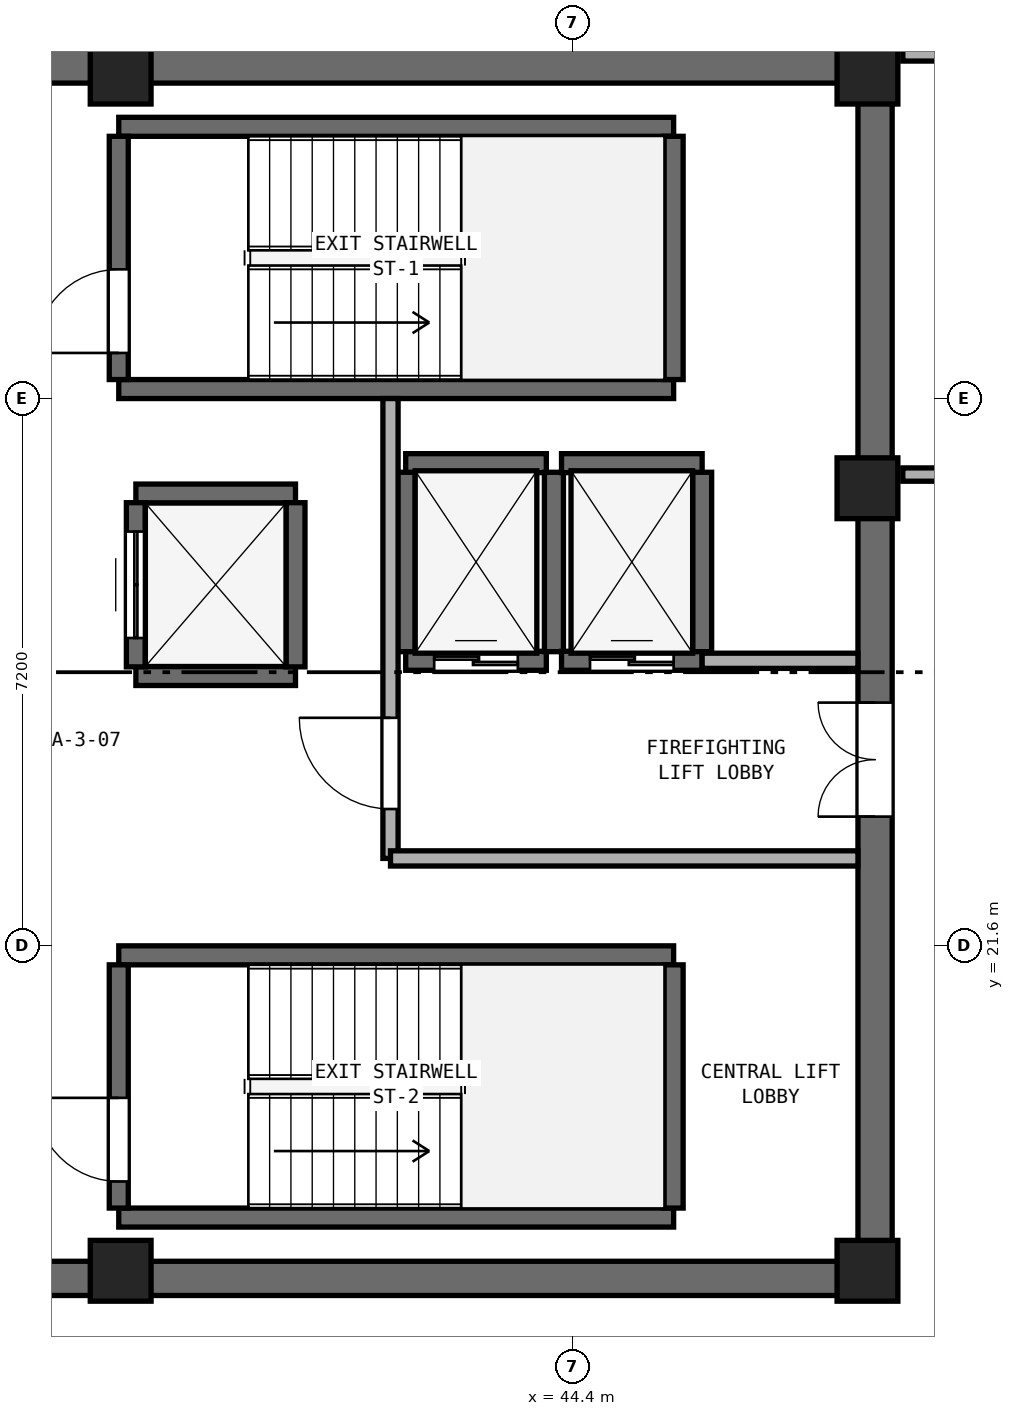
"""IFC4 building model, lengths in metres.
Left out: names, types, materials, properties, quantities, classifications, styles, units other than length and angle.
Written with IfcOpenShell. Run it as: python <this file> out.ifc"""

import sys

from ifc_helpers import new_model, si_unit, direction, frame, frame_2d, origin, origin_2d, place, context, subcontext, project, spatial, rectangle, extrude, element, fill, save


model = new_model("IFC4")
c1 = context("Model", 3, precision=1e-05, world=origin(), true_north=direction((0.0, 1.0)))
c2 = subcontext(c1, "Body", "Model", "MODEL_VIEW")
j1 = project(units=[si_unit("LENGTHUNIT", "METRE"), si_unit("PLANEANGLEUNIT", "RADIAN")], contexts=[c1])
p1 = place(None, origin())
s1 = spatial("IfcSite", under=j1, at=p1, CompositionType="ELEMENT")
p2 = place(p1, origin())
s2 = spatial("IfcBuilding", under=s1, at=p2, CompositionType="ELEMENT")
p3 = place(p2, frame((0.0, 0.0, 228.8)))
s3 = spatial("IfcBuildingStorey", under=s2, at=p3, CompositionType="ELEMENT", Elevation=228.8)
for number, where, z_axis, x_axis in (
    (1, (25.4, 17.225, 0.0), (0.0, 0.0, 1.0), (1.0, 0.0, 0.0)),
    (2, (25.4, 33.175, 0.0), (0.0, 0.0, 1.0), (1.0, 0.0, 0.0)),
):
    element("IfcWall", number, at=place(p3, frame(where, z_axis=z_axis, x_axis=x_axis)), inside=s3, PredefinedType="SHEAR", context=c2, shape_type="SweptSolid", body=[
        extrude(rectangle(XDim=23.2, YDim=0.45, at=frame_2d((11.6, 0.0))), origin(), (0.0, 0.0, 1.0), 3.51),
    ])
p4 = place(p3, frame((48.375, 17.45, 0.0), z_axis=(0.0, 0.0, 1.0), x_axis=(0.0, 1.0, 0.0)))
e3 = element("IfcWall", 3, at=p4, inside=s3, PredefinedType="SHEAR", context=c2, shape_type="SweptSolid", body=[
    extrude(rectangle(XDim=15.5, YDim=0.45, at=frame_2d((7.75, 0.0))), origin(), (0.0, 0.0, 1.0), 3.51),
])
p5 = place(p4, frame((5.85, 0.0, 0.0)))
e4 = element("IfcOpeningElement", 4, at=p5, cuts=e3, PredefinedType="OPENING", context=c2, shape_type="SweptSolid", body=[
    extrude(rectangle(XDim=1.5, YDim=2.15, at=frame_2d((0.75, 1.075))), frame((0.0, 0.235, 0.0), z_axis=(0.0, -1.0, 0.0), x_axis=(1.0, 0.0, 0.0)), (0.0, 0.0, 1.0), 0.47),
])
for number, where, z_axis, x_axis in (
    (5, (38.45, 17.325, 0.0), (0.0, 0.0, 1.0), (1.0, 0.0, 0.0)),
    (6, (48.275, 17.325, 0.0), (0.0, 0.0, 1.0), (1.0, 0.0, 0.0)),
    (7, (48.275, 27.62, 0.0), (0.0, 0.0, 1.0), (1.0, 0.0, 0.0)),
    (8, (48.275, 33.075, 0.0), (0.0, 0.0, 1.0), (1.0, 0.0, 0.0)),
    (9, (38.45, 33.075, 0.0), (0.0, 0.0, 1.0), (1.0, 0.0, 0.0)),
):
    element("IfcColumn", number, at=place(p3, frame(where, z_axis=z_axis, x_axis=x_axis)), inside=s3, PredefinedType="PILASTER", context=c2, shape_type="SweptSolid", body=[
        extrude(rectangle(XDim=0.8, YDim=0.8, at=origin_2d()), origin(), (0.0, 0.0, 1.0), 3.8),
    ])
for number, where, z_axis, x_axis in (
    (10, (38.425, 28.925, 0.0), (0.0, 0.0, 1.0), (1.0, 0.0, 0.0)),
    (11, (38.425, 32.375, 0.0), (0.0, 0.0, 1.0), (1.0, 0.0, 0.0)),
):
    element("IfcWall", number, at=place(p3, frame(where, z_axis=z_axis, x_axis=x_axis)), inside=s3, PredefinedType="SHEAR", context=c2, shape_type="SweptSolid", body=[
        extrude(rectangle(XDim=7.3, YDim=0.25, at=frame_2d((3.65, 0.0))), origin(), (0.0, 0.0, 1.0), 3.51),
    ])
p6 = place(p3, frame((38.425, 29.05, 0.0), z_axis=(0.0, 0.0, 1.0), x_axis=(0.0, 1.0, 0.0)))
e12 = element("IfcWall", 12, at=p6, inside=s3, PredefinedType="SHEAR", context=c2, shape_type="SweptSolid", body=[
    extrude(rectangle(XDim=3.2, YDim=0.25, at=frame_2d((1.6, 0.0))), origin(), (0.0, 0.0, 1.0), 3.51),
])
p7 = place(p6, frame((0.35, 0.0, 0.0)))
e13 = element("IfcOpeningElement", 13, at=p7, cuts=e12, PredefinedType="OPENING", context=c2, shape_type="SweptSolid", body=[
    extrude(rectangle(XDim=1.1, YDim=2.15, at=frame_2d((0.55, 1.075))), frame((0.0, 0.135, 0.0), z_axis=(0.0, -1.0, 0.0), x_axis=(1.0, 0.0, 0.0)), (0.0, 0.0, 1.0), 0.27),
])
p8 = place(p3, frame((45.725, 29.05, 0.0), z_axis=(0.0, 0.0, 1.0), x_axis=(0.0, 1.0, 0.0)))
e14 = element("IfcWall", 14, at=p8, inside=s3, PredefinedType="SHEAR", context=c2, shape_type="SweptSolid", body=[
    extrude(rectangle(XDim=3.2, YDim=0.25, at=frame_2d((1.6, 0.0))), origin(), (0.0, 0.0, 1.0), 3.51),
])
for number, where, z_axis, x_axis in (
    (15, (38.425, 18.025, 0.0), (0.0, 0.0, 1.0), (1.0, 0.0, 0.0)),
    (16, (38.425, 21.475, 0.0), (0.0, 0.0, 1.0), (1.0, 0.0, 0.0)),
):
    element("IfcWall", number, at=place(p3, frame(where, z_axis=z_axis, x_axis=x_axis)), inside=s3, PredefinedType="SHEAR", context=c2, shape_type="SweptSolid", body=[
        extrude(rectangle(XDim=7.3, YDim=0.25, at=frame_2d((3.65, 0.0))), origin(), (0.0, 0.0, 1.0), 3.51),
    ])
p9 = place(p3, frame((38.425, 18.15, 0.0), z_axis=(0.0, 0.0, 1.0), x_axis=(0.0, 1.0, 0.0)))
e17 = element("IfcWall", 17, at=p9, inside=s3, PredefinedType="SHEAR", context=c2, shape_type="SweptSolid", body=[
    extrude(rectangle(XDim=3.2, YDim=0.25, at=frame_2d((1.6, 0.0))), origin(), (0.0, 0.0, 1.0), 3.51),
])
p10 = place(p9, frame((0.35, 0.0, 0.0)))
e18 = element("IfcOpeningElement", 18, at=p10, cuts=e17, PredefinedType="OPENING", context=c2, shape_type="SweptSolid", body=[
    extrude(rectangle(XDim=1.1, YDim=2.15, at=frame_2d((0.55, 1.075))), frame((0.0, 0.135, 0.0), z_axis=(0.0, -1.0, 0.0), x_axis=(1.0, 0.0, 0.0)), (0.0, 0.0, 1.0), 0.27),
])
p11 = place(p3, frame((45.725, 18.15, 0.0), z_axis=(0.0, 0.0, 1.0), x_axis=(0.0, 1.0, 0.0)))
e19 = element("IfcWall", 19, at=p11, inside=s3, PredefinedType="SHEAR", context=c2, shape_type="SweptSolid", body=[
    extrude(rectangle(XDim=3.2, YDim=0.25, at=frame_2d((1.6, 0.0))), origin(), (0.0, 0.0, 1.0), 3.51),
])
p12 = place(p3, frame((42.2, 25.35, 0.0), z_axis=(0.0, 0.0, 1.0), x_axis=(1.0, 0.0, 0.0)))
e20 = element("IfcWall", 20, at=p12, inside=s3, PredefinedType="SHEAR", context=c2, shape_type="SweptSolid", body=[
    extrude(rectangle(XDim=1.85, YDim=0.25, at=frame_2d((0.925, 0.0))), origin(), (0.0, 0.0, 1.0), 3.51),
])
p13 = place(p12, frame((0.375, 0.0, 0.0)))
e21 = element("IfcOpeningElement", 21, at=p13, cuts=e20, PredefinedType="OPENING", context=c2, shape_type="SweptSolid", body=[
    extrude(rectangle(XDim=1.1, YDim=2.15, at=frame_2d((0.55, 1.075))), frame((0.0, 0.135, 0.0), z_axis=(0.0, -1.0, 0.0), x_axis=(1.0, 0.0, 0.0)), (0.0, 0.0, 1.0), 0.27),
])
p14 = place(p3, frame((42.2, 27.95, 0.0), z_axis=(0.0, 0.0, 1.0), x_axis=(1.0, 0.0, 0.0)))
e22 = element("IfcWall", 22, at=p14, inside=s3, PredefinedType="SHEAR", context=c2, shape_type="SweptSolid", body=[
    extrude(rectangle(XDim=1.85, YDim=0.25, at=frame_2d((0.925, 0.0))), origin(), (0.0, 0.0, 1.0), 3.51),
])
for number, where, z_axis, x_axis in (
    (23, (42.2, 25.47, 0.0), (0.0, 0.0, 1.0), (0.0, 1.0, 0.0)),
    (24, (44.15, 25.47, 0.0), (0.0, 0.0, 1.0), (0.0, 1.0, 0.0)),
):
    element("IfcWall", number, at=place(p3, frame(where, z_axis=z_axis, x_axis=x_axis)), inside=s3, PredefinedType="SHEAR", context=c2, shape_type="SweptSolid", body=[
        extrude(rectangle(XDim=2.36, YDim=0.25, at=frame_2d((1.18, 0.0))), origin(), (0.0, 0.0, 1.0), 3.51),
    ])
p15 = place(p3, frame((44.25, 25.35, 0.0), z_axis=(0.0, 0.0, 1.0), x_axis=(1.0, 0.0, 0.0)))
e25 = element("IfcWall", 25, at=p15, inside=s3, PredefinedType="SHEAR", context=c2, shape_type="SweptSolid", body=[
    extrude(rectangle(XDim=1.85, YDim=0.25, at=frame_2d((0.925, 0.0))), origin(), (0.0, 0.0, 1.0), 3.51),
])
p16 = place(p15, frame((0.375, 0.0, 0.0)))
e26 = element("IfcOpeningElement", 26, at=p16, cuts=e25, PredefinedType="OPENING", context=c2, shape_type="SweptSolid", body=[
    extrude(rectangle(XDim=1.1, YDim=2.15, at=frame_2d((0.55, 1.075))), frame((0.0, 0.135, 0.0), z_axis=(0.0, -1.0, 0.0), x_axis=(1.0, 0.0, 0.0)), (0.0, 0.0, 1.0), 0.27),
])
p17 = place(p3, frame((44.25, 27.95, 0.0), z_axis=(0.0, 0.0, 1.0), x_axis=(1.0, 0.0, 0.0)))
e27 = element("IfcWall", 27, at=p17, inside=s3, PredefinedType="SHEAR", context=c2, shape_type="SweptSolid", body=[
    extrude(rectangle(XDim=1.85, YDim=0.25, at=frame_2d((0.925, 0.0))), origin(), (0.0, 0.0, 1.0), 3.51),
])
p18 = place(p3, frame((46.1, 25.47, 0.0), z_axis=(0.0, 0.0, 1.0), x_axis=(0.0, 1.0, 0.0)))
e28 = element("IfcWall", 28, at=p18, inside=s3, PredefinedType="SHEAR", context=c2, shape_type="SweptSolid", body=[
    extrude(rectangle(XDim=2.36, YDim=0.25, at=frame_2d((1.18, 0.0))), origin(), (0.0, 0.0, 1.0), 3.51),
])
for number, where, z_axis, x_axis in (
    (29, (38.65, 25.15, 0.0), (0.0, 0.0, 1.0), (1.0, 0.0, 0.0)),
    (30, (38.65, 27.55, 0.0), (0.0, 0.0, 1.0), (1.0, 0.0, 0.0)),
):
    element("IfcWall", number, at=place(p3, frame(where, z_axis=z_axis, x_axis=x_axis)), inside=s3, PredefinedType="SHEAR", context=c2, shape_type="SweptSolid", body=[
        extrude(rectangle(XDim=2.1, YDim=0.25, at=frame_2d((1.05, 0.0))), origin(), (0.0, 0.0, 1.0), 3.51),
    ])
p19 = place(p3, frame((38.65, 25.27, 0.0), z_axis=(0.0, 0.0, 1.0), x_axis=(0.0, 1.0, 0.0)))
e31 = element("IfcWall", 31, at=p19, inside=s3, PredefinedType="SHEAR", context=c2, shape_type="SweptSolid", body=[
    extrude(rectangle(XDim=2.16, YDim=0.25, at=frame_2d((1.08, 0.0))), origin(), (0.0, 0.0, 1.0), 3.51),
])
p20 = place(p19, frame((0.38, 0.0, 0.0)))
e32 = element("IfcOpeningElement", 32, at=p20, cuts=e31, PredefinedType="OPENING", context=c2, shape_type="SweptSolid", body=[
    extrude(rectangle(XDim=1.4, YDim=2.2, at=frame_2d((0.7, 1.1))), frame((0.0, 0.135, 0.0), z_axis=(0.0, -1.0, 0.0), x_axis=(1.0, 0.0, 0.0)), (0.0, 0.0, 1.0), 0.27),
])
p21 = place(p3, frame((40.75, 25.27, 0.0), z_axis=(0.0, 0.0, 1.0), x_axis=(0.0, 1.0, 0.0)))
e33 = element("IfcWall", 33, at=p21, inside=s3, PredefinedType="SHEAR", context=c2, shape_type="SweptSolid", body=[
    extrude(rectangle(XDim=2.16, YDim=0.25, at=frame_2d((1.08, 0.0))), origin(), (0.0, 0.0, 1.0), 3.51),
])
p22 = place(p3, frame((42.0, 22.75, 0.0), z_axis=(0.0, 0.0, 1.0), x_axis=(0.0, 1.0, 0.0)))
e34 = element("IfcWall", 34, at=p22, inside=s3, PredefinedType="SOLIDWALL", context=c2, shape_type="SweptSolid", body=[
    extrude(rectangle(XDim=6.05, YDim=0.2, at=frame_2d((3.025, 0.0))), origin(), (0.0, 0.0, 1.0), 3.51),
])
p23 = place(p22, frame((0.65, 0.0, 0.0)))
e35 = element("IfcOpeningElement", 35, at=p23, cuts=e34, PredefinedType="OPENING", context=c2, shape_type="SweptSolid", body=[
    extrude(rectangle(XDim=1.2, YDim=2.15, at=frame_2d((0.6, 1.075))), frame((0.0, 0.11, 0.0), z_axis=(0.0, -1.0, 0.0), x_axis=(1.0, 0.0, 0.0)), (0.0, 0.0, 1.0), 0.22),
])
p24 = place(p3, frame((42.0, 22.75, 0.0), z_axis=(0.0, 0.0, 1.0), x_axis=(1.0, 0.0, 0.0)))
e36 = element("IfcWall", 36, at=p24, inside=s3, PredefinedType="SOLIDWALL", context=c2, shape_type="SweptSolid", body=[
    extrude(rectangle(XDim=6.15, YDim=0.2, at=frame_2d((3.075, 0.0))), origin(), (0.0, 0.0, 1.0), 3.51),
])
p25 = place(p3, frame((46.1, 25.35, 0.0), z_axis=(0.0, 0.0, 1.0), x_axis=(1.0, 0.0, 0.0)))
e37 = element("IfcWall", 37, at=p25, inside=s3, PredefinedType="SOLIDWALL", context=c2, shape_type="SweptSolid", body=[
    extrude(rectangle(XDim=2.05, YDim=0.2, at=frame_2d((1.025, 0.0))), origin(), (0.0, 0.0, 1.0), 3.51),
])
p26 = place(p3, frame((48.74, 27.8, 0.0), z_axis=(0.0, 0.0, 1.0), x_axis=(1.0, 0.0, 0.0)))
e38 = element("IfcWall", 38, at=p26, inside=s3, PredefinedType="PARTITIONING", context=c2, shape_type="SweptSolid", body=[
    extrude(rectangle(XDim=2.41, YDim=0.175, at=frame_2d((1.205, 0.0))), origin(), (0.0, 0.0, 1.0), 3.51),
])
p27 = place(p3, frame((48.74, 33.35, 0.0), z_axis=(0.0, 0.0, 1.0), x_axis=(1.0, 0.0, 0.0)))
e39 = element("IfcWall", 39, at=p27, inside=s3, PredefinedType="PARTITIONING", context=c2, shape_type="SweptSolid", body=[
    extrude(rectangle(XDim=2.41, YDim=0.22, at=frame_2d((1.205, 0.0))), origin(), (0.0, 0.0, 1.0), 2.893),
])
p28 = place(p7, origin())
e40 = element("IfcDoor", 40, at=p28, inside=s3, OperationType="SINGLE_SWING_LEFT", PredefinedType="DOOR", context=c2, shape_type="SweptSolid", body=[
    extrude(rectangle(XDim=1.1, YDim=2.15, at=frame_2d((0.55, 1.075))), frame((0.0, 0.025, 0.0), z_axis=(0.0, -1.0, 0.0), x_axis=(1.0, 0.0, 0.0)), (0.0, 0.0, 1.0), 0.05),
])
fill(e13, e40)
p29 = place(p10, origin())
e41 = element("IfcDoor", 41, at=p29, inside=s3, OperationType="SINGLE_SWING_RIGHT", PredefinedType="DOOR", context=c2, shape_type="SweptSolid", body=[
    extrude(rectangle(XDim=1.1, YDim=2.15, at=frame_2d((0.55, 1.075))), frame((0.0, 0.025, 0.0), z_axis=(0.0, -1.0, 0.0), x_axis=(1.0, 0.0, 0.0)), (0.0, 0.0, 1.0), 0.05),
])
fill(e18, e41)
p30 = place(p13, origin())
e42 = element("IfcDoor", 42, at=p30, inside=s3, OperationType="DOUBLE_DOOR_SLIDING", PredefinedType="DOOR", context=c2, shape_type="SweptSolid", body=[
    extrude(rectangle(XDim=1.1, YDim=2.15, at=frame_2d((0.55, 1.075))), frame((0.0, 0.025, 0.0), z_axis=(0.0, -1.0, 0.0), x_axis=(1.0, 0.0, 0.0)), (0.0, 0.0, 1.0), 0.05),
])
fill(e21, e42)
p31 = place(p16, origin())
e43 = element("IfcDoor", 43, at=p31, inside=s3, OperationType="DOUBLE_DOOR_SLIDING", PredefinedType="DOOR", context=c2, shape_type="SweptSolid", body=[
    extrude(rectangle(XDim=1.1, YDim=2.15, at=frame_2d((0.55, 1.075))), frame((0.0, 0.025, 0.0), z_axis=(0.0, -1.0, 0.0), x_axis=(1.0, 0.0, 0.0)), (0.0, 0.0, 1.0), 0.05),
])
fill(e26, e43)
p32 = place(p20, origin())
e44 = element("IfcDoor", 44, at=p32, inside=s3, OperationType="DOUBLE_DOOR_SLIDING", PredefinedType="DOOR", context=c2, shape_type="SweptSolid", body=[
    extrude(rectangle(XDim=1.4, YDim=2.2, at=frame_2d((0.7, 1.1))), frame((0.0, 0.025, 0.0), z_axis=(0.0, -1.0, 0.0), x_axis=(1.0, 0.0, 0.0)), (0.0, 0.0, 1.0), 0.05),
])
fill(e32, e44)
p33 = place(p23, origin())
e45 = element("IfcDoor", 45, at=p33, inside=s3, OperationType="SINGLE_SWING_RIGHT", PredefinedType="DOOR", context=c2, shape_type="SweptSolid", body=[
    extrude(rectangle(XDim=1.2, YDim=2.15, at=frame_2d((0.6, 1.075))), frame((0.0, 0.025, 0.0), z_axis=(0.0, -1.0, 0.0), x_axis=(1.0, 0.0, 0.0)), (0.0, 0.0, 1.0), 0.05),
])
fill(e35, e45)
p34 = place(p5, origin())
e46 = element("IfcDoor", 46, at=p34, inside=s3, OperationType="DOUBLE_DOOR_SINGLE_SWING", PredefinedType="DOOR", context=c2, shape_type="SweptSolid", body=[
    extrude(rectangle(XDim=1.5, YDim=2.15, at=frame_2d((0.75, 1.075))), frame((0.0, 0.025, 0.0), z_axis=(0.0, -1.0, 0.0), x_axis=(1.0, 0.0, 0.0)), (0.0, 0.0, 1.0), 0.05),
])
fill(e4, e46)
save(model, sys.argv[1])
